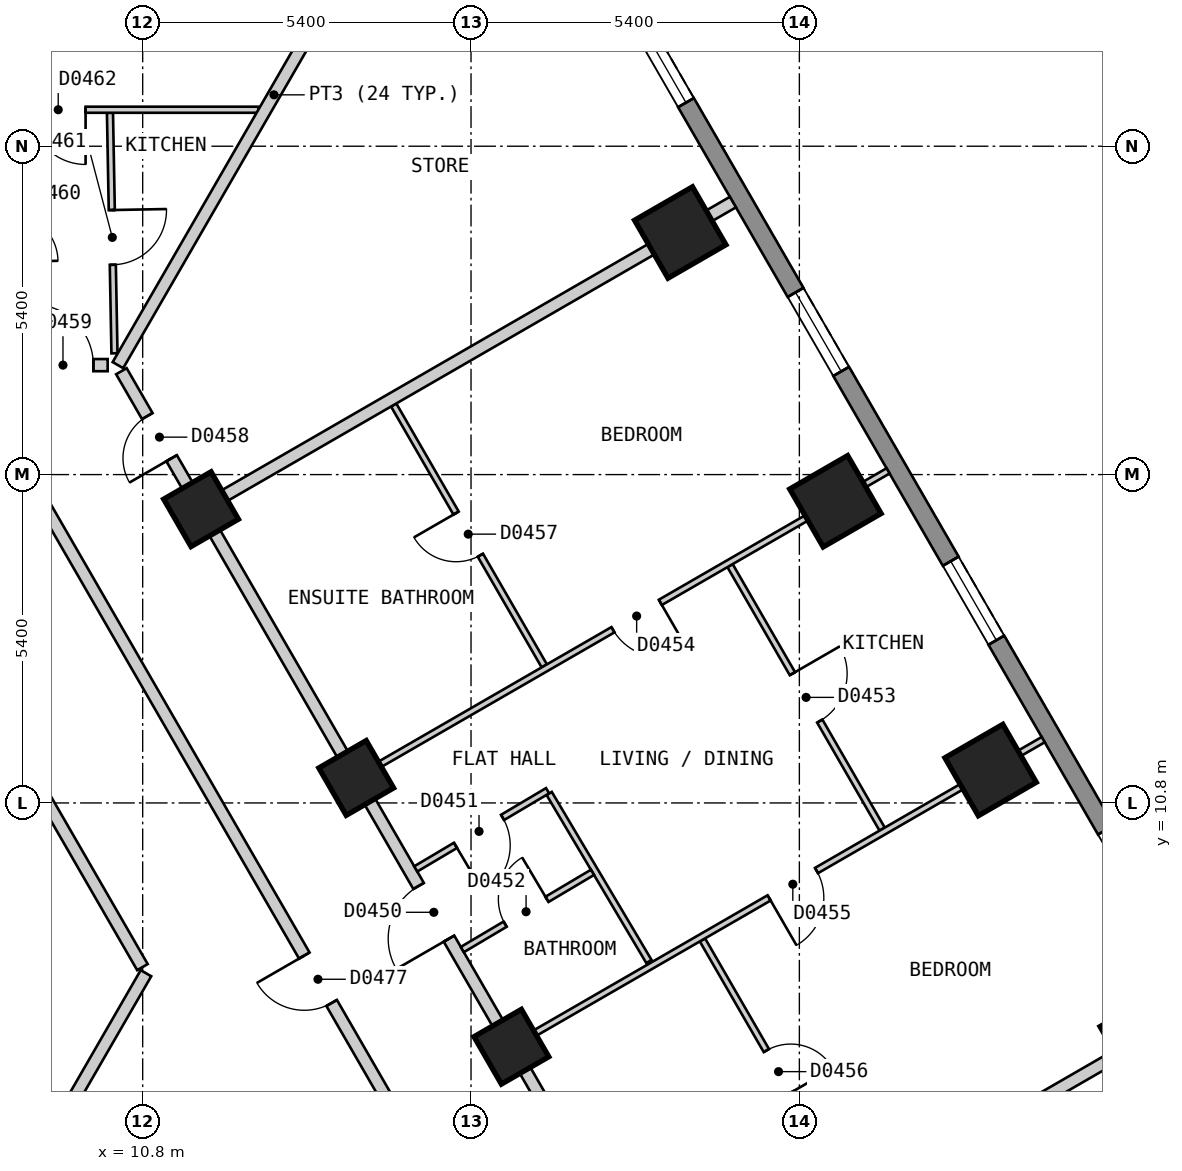
"""IFC4 building model, lengths in metres.
Left out: names, types, materials, properties, quantities, classifications, styles, units other than length and angle.
Written with IfcOpenShell. Run it as: python <this file> out.ifc"""

import sys

from ifc_helpers import new_model, si_unit, direction, frame, frame_2d, origin, origin_2d, place, context, subcontext, project, spatial, polyline, rectangle, outline, extrude, element, fill, save


model = new_model("IFC4")
c1 = context("Model", 3, precision=1e-05, world=origin(), true_north=direction((0.0, 1.0)))
c2 = subcontext(c1, "Body", "Model", "MODEL_VIEW")
j1 = project(units=[si_unit("LENGTHUNIT", "METRE"), si_unit("PLANEANGLEUNIT", "RADIAN")], contexts=[c1])
p1 = place(None, origin())
s1 = spatial("IfcSite", under=j1, at=p1, CompositionType="ELEMENT")
p2 = place(p1, origin())
s2 = spatial("IfcBuilding", under=s1, at=p2, CompositionType="ELEMENT")
p3 = place(p2, frame((0.0, 0.0, 38.4)))
s3 = spatial("IfcBuildingStorey", under=s2, at=p3, CompositionType="ELEMENT", Elevation=38.4)
for number, where, z_axis, x_axis in (
    (1, (27.297, 6.921, 0.0), (0.0, 0.0, 1.0), (-0.5, 0.866, 0.0)),
    (2, (24.745, 11.341, 0.0), (0.0, 0.0, 1.0), (-0.5, 0.866, 0.0)),
    (3, (22.193, 15.761, 0.0), (0.0, 0.0, 1.0), (-0.5, 0.866, 0.0)),
    (4, (19.641, 20.181, 0.0), (0.0, 0.0, 1.0), (-0.5, 0.866, 0.0)),
):
    element("IfcColumn", number, at=place(p3, frame(where, z_axis=z_axis, x_axis=x_axis)), inside=s3, PredefinedType="COLUMN", context=c2, shape_type="SweptSolid", body=[
        extrude(rectangle(XDim=1.1, YDim=1.1, at=origin_2d()), origin(), (0.0, 0.0, 1.0), 3.0),
    ])
for number, where, z_axis, x_axis in (
    (5, (16.864, 6.791, 0.0), (0.0, 0.0, 1.0), (-0.5, 0.866, 0.0)),
    (6, (14.312, 11.211, 0.0), (0.0, 0.0, 1.0), (-0.5, 0.866, 0.0)),
    (7, (11.76, 15.631, 0.0), (0.0, 0.0, 1.0), (-0.5, 0.866, 0.0)),
):
    element("IfcColumn", number, at=place(p3, frame(where, z_axis=z_axis, x_axis=x_axis)), inside=s3, PredefinedType="COLUMN", context=c2, shape_type="SweptSolid", body=[
        extrude(rectangle(XDim=0.9, YDim=0.9, at=origin_2d()), origin(), (0.0, 0.0, 1.0), 3.0),
    ])
p4 = place(p3, frame((31.22, 2.425, 0.0), z_axis=(0.0, 0.0, 1.0), x_axis=(-0.500001938803, 0.866024284413, 0.0)))
e8 = element("IfcWall", 8, at=p4, inside=s3, PredefinedType="SOLIDWALL", context=c2, shape_type="SweptSolid", body=[
    extrude(outline(polyline([(0.0, -0.15), (27.02, -0.15), (26.94, 0.15), (0.08, 0.15), (0.0, -0.15)])), origin(), (0.0, 0.0, 1.0), 2.7),
])
p5 = place(p4, frame((2.553, 0.0, 0.15)))
e9 = element("IfcOpeningElement", 9, at=p5, cuts=e8, PredefinedType="OPENING", context=c2, shape_type="SweptSolid", body=[
    extrude(rectangle(XDim=1.5, YDim=2.1, at=frame_2d((0.75, 1.05))), frame((0.0, 0.16, 0.0), z_axis=(0.0, -1.0, 0.0), x_axis=(1.0, 0.0, 0.0)), (0.0, 0.0, 1.0), 0.32),
])
p6 = place(p4, frame((7.657, 0.0, 0.15)))
e10 = element("IfcOpeningElement", 10, at=p6, cuts=e8, PredefinedType="OPENING", context=c2, shape_type="SweptSolid", body=[
    extrude(rectangle(XDim=1.5, YDim=2.1, at=frame_2d((0.75, 1.05))), frame((0.0, 0.16, 0.0), z_axis=(0.0, -1.0, 0.0), x_axis=(1.0, 0.0, 0.0)), (0.0, 0.0, 1.0), 0.32),
])
p7 = place(p4, frame((12.761, 0.0, 0.15)))
e11 = element("IfcOpeningElement", 11, at=p7, cuts=e8, PredefinedType="OPENING", context=c2, shape_type="SweptSolid", body=[
    extrude(rectangle(XDim=1.5, YDim=2.1, at=frame_2d((0.75, 1.05))), frame((0.0, 0.16, 0.0), z_axis=(0.0, -1.0, 0.0), x_axis=(1.0, 0.0, 0.0)), (0.0, 0.0, 1.0), 0.32),
])
p8 = place(p4, frame((17.865, 0.0, 0.15)))
e12 = element("IfcOpeningElement", 12, at=p8, cuts=e8, PredefinedType="OPENING", context=c2, shape_type="SweptSolid", body=[
    extrude(rectangle(XDim=1.5, YDim=2.1, at=frame_2d((0.75, 1.05))), frame((0.0, 0.16, 0.0), z_axis=(0.0, -1.0, 0.0), x_axis=(1.0, 0.0, 0.0)), (0.0, 0.0, 1.0), 0.32),
])
p9 = place(p4, frame((22.969, 0.0, 0.15)))
e13 = element("IfcOpeningElement", 13, at=p9, cuts=e8, PredefinedType="OPENING", context=c2, shape_type="SweptSolid", body=[
    extrude(rectangle(XDim=1.5, YDim=2.1, at=frame_2d((0.75, 1.05))), frame((0.0, 0.16, 0.0), z_axis=(0.0, -1.0, 0.0), x_axis=(1.0, 0.0, 0.0)), (0.0, 0.0, 1.0), 0.32),
])
p10 = place(p3, frame((6.409, 15.7, 0.0), z_axis=(0.0, 0.0, 1.0), x_axis=(0.499930377127, -0.866065596838, 0.0)))
e14 = element("IfcWall", 14, at=p10, inside=s3, PredefinedType="PARTITIONING", context=c2, shape_type="SweptSolid", body=[
    extrude(rectangle(XDim=8.775, YDim=0.2, at=frame_2d((4.388, 0.0))), origin(), (0.0, 0.0, 1.0), 2.7),
])
p11 = place(p3, frame((9.18, 15.7, 0.0), z_axis=(0.0, 0.0, 1.0), x_axis=(0.500003652032, -0.866023295272, 0.0)))
e15 = element("IfcWall", 15, at=p11, inside=s3, PredefinedType="PARTITIONING", context=c2, shape_type="SweptSolid", body=[
    extrude(rectangle(XDim=18.012, YDim=0.2, at=frame_2d((9.006, 0.0))), origin(), (0.0, 0.0, 1.0), 2.7),
])
p12 = place(p11, frame((8.556, 0.0, 0.0)))
e16 = element("IfcOpeningElement", 16, at=p12, cuts=e15, PredefinedType="OPENING", context=c2, shape_type="SweptSolid", body=[
    extrude(rectangle(XDim=0.9, YDim=2.1, at=frame_2d((0.45, 1.05))), frame((0.0, 0.11, 0.0), z_axis=(0.0, -1.0, 0.0), x_axis=(1.0, 0.0, 0.0)), (0.0, 0.0, 1.0), 0.22),
])
p13 = place(p3, frame((10.45, 17.9, 0.0), z_axis=(0.0, 0.0, 1.0), x_axis=(0.500034352617, -0.866005569383, 0.0)))
e17 = element("IfcWall", 17, at=p13, inside=s3, PredefinedType="PARTITIONING", context=c2, shape_type="SweptSolid", body=[
    extrude(rectangle(XDim=20.553, YDim=0.2, at=frame_2d((10.276, 0.0))), origin(), (0.0, 0.0, 1.0), 2.7),
])
p14 = place(p13, frame((9.775, 0.0, 0.0)))
e18 = element("IfcOpeningElement", 18, at=p14, cuts=e17, PredefinedType="OPENING", context=c2, shape_type="SweptSolid", body=[
    extrude(rectangle(XDim=1.0, YDim=2.1, at=frame_2d((0.5, 1.05))), frame((0.0, 0.11, 0.0), z_axis=(0.0, -1.0, 0.0), x_axis=(1.0, 0.0, 0.0)), (0.0, 0.0, 1.0), 0.22),
])
p15 = place(p13, frame((0.852, 0.0, 0.0)))
e19 = element("IfcOpeningElement", 19, at=p15, cuts=e17, PredefinedType="OPENING", context=c2, shape_type="SweptSolid", body=[
    extrude(rectangle(XDim=0.8, YDim=2.1, at=frame_2d((0.4, 1.05))), frame((0.0, 0.11, 0.0), z_axis=(0.0, -1.0, 0.0), x_axis=(1.0, 0.0, 0.0)), (0.0, 0.0, 1.0), 0.22),
])
p16 = place(p3, frame((-10.276, 18.0, 0.0), z_axis=(0.0, 0.0, 1.0), x_axis=(1.0, 0.0, 0.0)))
e20 = element("IfcWall", 20, at=p16, inside=s3, PredefinedType="PARTITIONING", context=c2, shape_type="SweptSolid", body=[
    extrude(rectangle(XDim=20.5, YDim=0.2, at=frame_2d((10.25, 0.0))), origin(), (0.0, 0.0, 1.0), 2.7),
])
p17 = place(p16, frame((19.265, 0.0, 0.0)))
e21 = element("IfcOpeningElement", 21, at=p17, cuts=e20, PredefinedType="OPENING", context=c2, shape_type="SweptSolid", body=[
    extrude(rectangle(XDim=1.0, YDim=2.1, at=frame_2d((0.5, 1.05))), frame((0.0, 0.11, 0.0), z_axis=(0.0, -1.0, 0.0), x_axis=(1.0, 0.0, 0.0)), (0.0, 0.0, 1.0), 0.22),
])
p18 = place(p16, frame((9.775, 0.0, 0.0)))
e22 = element("IfcOpeningElement", 22, at=p18, cuts=e20, PredefinedType="OPENING", context=c2, shape_type="SweptSolid", body=[
    extrude(rectangle(XDim=1.0, YDim=2.1, at=frame_2d((0.5, 1.05))), frame((0.0, 0.11, 0.0), z_axis=(0.0, -1.0, 0.0), x_axis=(1.0, 0.0, 0.0)), (0.0, 0.0, 1.0), 0.22),
])
p19 = place(p16, frame((4.671, 0.0, 0.0)))
e23 = element("IfcOpeningElement", 23, at=p19, cuts=e20, PredefinedType="OPENING", context=c2, shape_type="SweptSolid", body=[
    extrude(rectangle(XDim=1.0, YDim=2.1, at=frame_2d((0.5, 1.05))), frame((0.0, 0.11, 0.0), z_axis=(0.0, -1.0, 0.0), x_axis=(1.0, 0.0, 0.0)), (0.0, 0.0, 1.0), 0.22),
])
p20 = place(p3, frame((7.028, 1.373, 0.0), z_axis=(0.0, 0.0, 1.0), x_axis=(0.49998574534, 0.86603363356, 0.0)))
e24 = element("IfcWall", 24, at=p20, inside=s3, PredefinedType="PARTITIONING", context=c2, shape_type="SweptSolid", body=[
    extrude(rectangle(XDim=7.652, YDim=0.2, at=frame_2d((3.826, 0.0))), origin(), (0.0, 0.0, 1.0), 2.7),
])
p21 = place(p3, frame((17.485, 10.957, 0.0), z_axis=(0.0, 0.0, 1.0), x_axis=(0.510324709283, -0.859981796956, 0.0)))
e25 = element("IfcWall", 25, at=p21, inside=s3, PredefinedType="PARTITIONING", context=c2, shape_type="SweptSolid", body=[
    extrude(rectangle(XDim=3.215, YDim=0.1, at=frame_2d((1.608, 0.0))), origin(), (0.0, 0.0, 1.0), 2.7),
])
p22 = place(p3, frame((14.928, 17.344, 0.0), z_axis=(0.0, 0.0, 1.0), x_axis=(0.500029609304, -0.86600830817, 0.0)))
e26 = element("IfcWall", 26, at=p22, inside=s3, PredefinedType="PARTITIONING", context=c2, shape_type="SweptSolid", body=[
    extrude(rectangle(XDim=4.954, YDim=0.1, at=frame_2d((2.477, 0.0))), origin(), (0.0, 0.0, 1.0), 2.7),
])
p23 = place(p22, frame((2.052, 0.0, 0.0)))
e27 = element("IfcOpeningElement", 27, at=p23, cuts=e26, PredefinedType="OPENING", context=c2, shape_type="SweptSolid", body=[
    extrude(rectangle(XDim=0.8, YDim=2.1, at=frame_2d((0.4, 1.05))), frame((0.0, 0.06, 0.0), z_axis=(0.0, -1.0, 0.0), x_axis=(1.0, 0.0, 0.0)), (0.0, 0.0, 1.0), 0.12),
])
p24 = place(p3, frame((20.006, 8.548, 0.0), z_axis=(0.0, 0.0, 1.0), x_axis=(0.500055121407, -0.865993577086, 0.0)))
e28 = element("IfcWall", 28, at=p24, inside=s3, PredefinedType="PARTITIONING", context=c2, shape_type="SweptSolid", body=[
    extrude(rectangle(XDim=4.955, YDim=0.1, at=frame_2d((2.478, 0.0))), origin(), (0.0, 0.0, 1.0), 2.7),
])
p25 = place(p24, frame((2.102, 0.0, 0.0)))
e29 = element("IfcOpeningElement", 29, at=p25, cuts=e28, PredefinedType="OPENING", context=c2, shape_type="SweptSolid", body=[
    extrude(rectangle(XDim=0.8, YDim=2.1, at=frame_2d((0.4, 1.05))), frame((0.0, 0.06, 0.0), z_axis=(0.0, -1.0, 0.0), x_axis=(1.0, 0.0, 0.0)), (0.0, 0.0, 1.0), 0.12),
])
p26 = place(p3, frame((20.46, 14.703, 0.0), z_axis=(0.0, 0.0, 1.0), x_axis=(0.499918186652, -0.866072633591, 0.0)))
e30 = element("IfcWall", 30, at=p26, inside=s3, PredefinedType="PARTITIONING", context=c2, shape_type="SweptSolid", body=[
    extrude(rectangle(XDim=5.003, YDim=0.1, at=frame_2d((2.501, 0.0))), origin(), (0.0, 0.0, 1.0), 2.7),
])
p27 = place(p26, frame((2.052, 0.0, 0.0)))
e31 = element("IfcOpeningElement", 31, at=p27, cuts=e30, PredefinedType="OPENING", context=c2, shape_type="SweptSolid", body=[
    extrude(rectangle(XDim=0.9, YDim=2.1, at=frame_2d((0.45, 1.05))), frame((0.0, 0.06, 0.0), z_axis=(0.0, -1.0, 0.0), x_axis=(1.0, 0.0, 0.0)), (0.0, 0.0, 1.0), 0.12),
])
p28 = place(p3, frame((10.262, 22.15, 0.0), z_axis=(0.0, 0.0, 1.0), x_axis=(0.018696971826, -0.999825196344, 0.0)))
e32 = element("IfcWall", 32, at=p28, inside=s3, PredefinedType="PARTITIONING", context=c2, shape_type="SweptSolid", body=[
    extrude(rectangle(XDim=3.957, YDim=0.1, at=frame_2d((1.978, 0.0))), origin(), (0.0, 0.0, 1.0), 2.7),
])
p29 = place(p28, frame((1.6, 0.0, 0.0)))
e33 = element("IfcOpeningElement", 33, at=p29, cuts=e32, PredefinedType="OPENING", context=c2, shape_type="SweptSolid", body=[
    extrude(rectangle(XDim=0.9, YDim=2.1, at=frame_2d((0.45, 1.05))), frame((0.0, 0.06, 0.0), z_axis=(0.0, -1.0, 0.0), x_axis=(1.0, 0.0, 0.0)), (0.0, 0.0, 1.0), 0.12),
])
p30 = place(p3, frame((7.755, 22.2, 0.0), z_axis=(0.0, 0.0, 1.0), x_axis=(1.0, 0.0, 0.0)))
e34 = element("IfcWall", 34, at=p30, inside=s3, PredefinedType="PARTITIONING", context=c2, shape_type="SweptSolid", body=[
    extrude(rectangle(XDim=4.947, YDim=0.1, at=frame_2d((2.474, 0.0))), origin(), (0.0, 0.0, 1.0), 2.7),
])
p31 = place(p30, frame((1.206, 0.0, 0.0)))
e35 = element("IfcOpeningElement", 35, at=p31, cuts=e34, PredefinedType="OPENING", context=c2, shape_type="SweptSolid", body=[
    extrude(rectangle(XDim=0.9, YDim=2.1, at=frame_2d((0.45, 1.05))), frame((0.0, 0.06, 0.0), z_axis=(0.0, -1.0, 0.0), x_axis=(1.0, 0.0, 0.0)), (0.0, 0.0, 1.0), 0.12),
])
p32 = place(p3, frame((16.95, 6.841, 0.0), z_axis=(0.0, 0.0, 1.0), x_axis=(0.866022959057, 0.500004234368, 0.0)))
e36 = element("IfcWall", 36, at=p32, inside=s3, PredefinedType="PARTITIONING", context=c2, shape_type="SweptSolid", body=[
    extrude(rectangle(XDim=10.0, YDim=0.1, at=frame_2d((5.0, 0.0))), origin(), (0.0, 0.0, 1.0), 2.7),
])
p33 = place(p32, frame((4.795, 0.0, 0.0)))
e37 = element("IfcOpeningElement", 37, at=p33, cuts=e36, PredefinedType="OPENING", context=c2, shape_type="SweptSolid", body=[
    extrude(rectangle(XDim=0.9, YDim=2.1, at=frame_2d((0.45, 1.05))), frame((0.0, 0.06, 0.0), z_axis=(0.0, -1.0, 0.0), x_axis=(1.0, 0.0, 0.0)), (0.0, 0.0, 1.0), 0.12),
])
p34 = place(p3, frame((14.399, 11.261, 0.0), z_axis=(0.0, 0.0, 1.0), x_axis=(0.866022959057, 0.500004234368, 0.0)))
e38 = element("IfcWall", 38, at=p34, inside=s3, PredefinedType="PARTITIONING", context=c2, shape_type="SweptSolid", body=[
    extrude(rectangle(XDim=10.0, YDim=0.1, at=frame_2d((5.0, 0.0))), origin(), (0.0, 0.0, 1.0), 2.7),
])
p35 = place(p34, frame((4.775, 0.0, 0.0)))
e39 = element("IfcOpeningElement", 39, at=p35, cuts=e38, PredefinedType="OPENING", context=c2, shape_type="SweptSolid", body=[
    extrude(rectangle(XDim=0.9, YDim=2.1, at=frame_2d((0.45, 1.05))), frame((0.0, 0.06, 0.0), z_axis=(0.0, -1.0, 0.0), x_axis=(1.0, 0.0, 0.0)), (0.0, 0.0, 1.0), 0.12),
])
p36 = place(p3, frame((16.057, 8.389, 0.0), z_axis=(0.0, 0.0, 1.0), x_axis=(0.860077993161, 0.510162567893, 0.0)))
e40 = element("IfcWall", 40, at=p36, inside=s3, PredefinedType="PARTITIONING", context=c2, shape_type="SweptSolid", body=[
    extrude(rectangle(XDim=2.49, YDim=0.1, at=frame_2d((1.245, 0.0))), origin(), (0.0, 0.0, 1.0), 2.7),
])
p37 = place(p36, frame((0.819, 0.0, 0.0)))
e41 = element("IfcOpeningElement", 41, at=p37, cuts=e40, PredefinedType="OPENING", context=c2, shape_type="SweptSolid", body=[
    extrude(rectangle(XDim=0.8, YDim=2.1, at=frame_2d((0.4, 1.05))), frame((0.0, 0.06, 0.0), z_axis=(0.0, -1.0, 0.0), x_axis=(1.0, 0.0, 0.0)), (0.0, 0.0, 1.0), 0.12),
])
p38 = place(p3, frame((15.291, 9.715, 0.0), z_axis=(0.0, 0.0, 1.0), x_axis=(0.860088508644, 0.51014483953, 0.0)))
e42 = element("IfcWall", 42, at=p38, inside=s3, PredefinedType="PARTITIONING", context=c2, shape_type="SweptSolid", body=[
    extrude(rectangle(XDim=2.521, YDim=0.1, at=frame_2d((1.26, 0.0))), origin(), (0.0, 0.0, 1.0), 2.7),
])
p39 = place(p38, frame((0.76, 0.0, 0.0)))
e43 = element("IfcOpeningElement", 43, at=p39, cuts=e42, PredefinedType="OPENING", context=c2, shape_type="SweptSolid", body=[
    extrude(rectangle(XDim=0.9, YDim=2.1, at=frame_2d((0.45, 1.05))), frame((0.0, 0.06, 0.0), z_axis=(0.0, -1.0, 0.0), x_axis=(1.0, 0.0, 0.0)), (0.0, 0.0, 1.0), 0.12),
])
p40 = place(p3, frame((10.393, 18.0, 0.0), z_axis=(0.0, 0.0, 1.0), x_axis=(0.499945497007, 0.866056868816, 0.0)))
e44 = element("IfcWall", 44, at=p40, inside=s3, PredefinedType="PARTITIONING", context=c2, shape_type="SweptSolid", body=[
    extrude(rectangle(XDim=10.265, YDim=0.2, at=frame_2d((5.132, 0.0))), origin(), (0.0, 0.0, 1.0), 2.7),
])
p41 = place(p3, frame((19.503, 2.421, 0.0), z_axis=(0.0, 0.0, 1.0), x_axis=(0.866065245018, 0.499930986609, 0.0)))
e45 = element("IfcWall", 45, at=p41, inside=s3, PredefinedType="PARTITIONING", context=c2, shape_type="SweptSolid", body=[
    extrude(rectangle(XDim=10.0, YDim=0.2, at=frame_2d((5.0, 0.0))), origin(), (0.0, 0.0, 1.0), 2.7),
])
p42 = place(p3, frame((11.847, 15.681, 0.0), z_axis=(0.0, 0.0, 1.0), x_axis=(0.866022959057, 0.500004234368, 0.0)))
e46 = element("IfcWall", 46, at=p42, inside=s3, PredefinedType="PARTITIONING", context=c2, shape_type="SweptSolid", body=[
    extrude(rectangle(XDim=10.0, YDim=0.2, at=frame_2d((5.0, 0.0))), origin(), (0.0, 0.0, 1.0), 2.7),
])
p43 = place(p7, origin())
e47 = element("IfcWindow", 47, at=p43, inside=s3, PartitioningType="SINGLE_PANEL", PredefinedType="WINDOW", context=c2, shape_type="SweptSolid", body=[
    extrude(rectangle(XDim=1.5, YDim=2.1, at=frame_2d((0.75, 1.05))), frame((0.0, 0.03, 0.0), z_axis=(0.0, -1.0, 0.0), x_axis=(1.0, 0.0, 0.0)), (0.0, 0.0, 1.0), 0.06),
])
fill(e11, e47)
p44 = place(p8, origin())
e48 = element("IfcWindow", 48, at=p44, inside=s3, PartitioningType="SINGLE_PANEL", PredefinedType="WINDOW", context=c2, shape_type="SweptSolid", body=[
    extrude(rectangle(XDim=1.5, YDim=2.1, at=frame_2d((0.75, 1.05))), frame((0.0, 0.03, 0.0), z_axis=(0.0, -1.0, 0.0), x_axis=(1.0, 0.0, 0.0)), (0.0, 0.0, 1.0), 0.06),
])
fill(e12, e48)
p45 = place(p9, origin())
e49 = element("IfcWindow", 49, at=p45, inside=s3, PartitioningType="SINGLE_PANEL", PredefinedType="WINDOW", context=c2, shape_type="SweptSolid", body=[
    extrude(rectangle(XDim=1.5, YDim=2.1, at=frame_2d((0.75, 1.05))), frame((0.0, 0.03, 0.0), z_axis=(0.0, -1.0, 0.0), x_axis=(1.0, 0.0, 0.0)), (0.0, 0.0, 1.0), 0.06),
])
fill(e13, e49)
p46 = place(p14, origin())
e50 = element("IfcDoor", 50, at=p46, inside=s3, OperationType="SINGLE_SWING_RIGHT", PredefinedType="DOOR", context=c2, shape_type="SweptSolid", body=[
    extrude(rectangle(XDim=1.0, YDim=2.1, at=frame_2d((0.5, 1.05))), frame((0.0, 0.025, 0.0), z_axis=(0.0, -1.0, 0.0), x_axis=(1.0, 0.0, 0.0)), (0.0, 0.0, 1.0), 0.05),
])
fill(e18, e50)
p47 = place(p39, origin())
e51 = element("IfcDoor", 51, at=p47, inside=s3, OperationType="SINGLE_SWING_LEFT", PredefinedType="DOOR", context=c2, shape_type="SweptSolid", body=[
    extrude(rectangle(XDim=0.9, YDim=2.1, at=frame_2d((0.45, 1.05))), frame((0.0, 0.025, 0.0), z_axis=(0.0, -1.0, 0.0), x_axis=(1.0, 0.0, 0.0)), (0.0, 0.0, 1.0), 0.05),
])
fill(e43, e51)
p48 = place(p37, origin())
e52 = element("IfcDoor", 52, at=p48, inside=s3, OperationType="SINGLE_SWING_RIGHT", PredefinedType="DOOR", context=c2, shape_type="SweptSolid", body=[
    extrude(rectangle(XDim=0.8, YDim=2.1, at=frame_2d((0.4, 1.05))), frame((0.0, 0.025, 0.0), z_axis=(0.0, -1.0, 0.0), x_axis=(1.0, 0.0, 0.0)), (0.0, 0.0, 1.0), 0.05),
])
fill(e41, e52)
p49 = place(p27, origin())
e53 = element("IfcDoor", 53, at=p49, inside=s3, OperationType="SINGLE_SWING_LEFT", PredefinedType="DOOR", context=c2, shape_type="SweptSolid", body=[
    extrude(rectangle(XDim=0.9, YDim=2.1, at=frame_2d((0.45, 1.05))), frame((0.0, 0.025, 0.0), z_axis=(0.0, -1.0, 0.0), x_axis=(1.0, 0.0, 0.0)), (0.0, 0.0, 1.0), 0.05),
])
fill(e31, e53)
p50 = place(p35, origin())
e54 = element("IfcDoor", 54, at=p50, inside=s3, OperationType="SINGLE_SWING_RIGHT", PredefinedType="DOOR", context=c2, shape_type="SweptSolid", body=[
    extrude(rectangle(XDim=0.9, YDim=2.1, at=frame_2d((0.45, 1.05))), frame((0.0, 0.025, 0.0), z_axis=(0.0, -1.0, 0.0), x_axis=(1.0, 0.0, 0.0)), (0.0, 0.0, 1.0), 0.05),
])
fill(e39, e54)
p51 = place(p33, origin())
e55 = element("IfcDoor", 55, at=p51, inside=s3, OperationType="SINGLE_SWING_LEFT", PredefinedType="DOOR", context=c2, shape_type="SweptSolid", body=[
    extrude(rectangle(XDim=0.9, YDim=2.1, at=frame_2d((0.45, 1.05))), frame((0.0, 0.025, 0.0), z_axis=(0.0, -1.0, 0.0), x_axis=(1.0, 0.0, 0.0)), (0.0, 0.0, 1.0), 0.05),
])
fill(e37, e55)
p52 = place(p25, origin())
e56 = element("IfcDoor", 56, at=p52, inside=s3, OperationType="SINGLE_SWING_RIGHT", PredefinedType="DOOR", context=c2, shape_type="SweptSolid", body=[
    extrude(rectangle(XDim=0.8, YDim=2.1, at=frame_2d((0.4, 1.05))), frame((0.0, 0.025, 0.0), z_axis=(0.0, -1.0, 0.0), x_axis=(1.0, 0.0, 0.0)), (0.0, 0.0, 1.0), 0.05),
])
fill(e29, e56)
p53 = place(p23, origin())
e57 = element("IfcDoor", 57, at=p53, inside=s3, OperationType="SINGLE_SWING_LEFT", PredefinedType="DOOR", context=c2, shape_type="SweptSolid", body=[
    extrude(rectangle(XDim=0.8, YDim=2.1, at=frame_2d((0.4, 1.05))), frame((0.0, 0.025, 0.0), z_axis=(0.0, -1.0, 0.0), x_axis=(1.0, 0.0, 0.0)), (0.0, 0.0, 1.0), 0.05),
])
fill(e27, e57)
p54 = place(p15, origin())
e58 = element("IfcDoor", 58, at=p54, inside=s3, OperationType="SINGLE_SWING_RIGHT", PredefinedType="DOOR", context=c2, shape_type="SweptSolid", body=[
    extrude(rectangle(XDim=0.8, YDim=2.1, at=frame_2d((0.4, 1.05))), frame((0.0, 0.025, 0.0), z_axis=(0.0, -1.0, 0.0), x_axis=(1.0, 0.0, 0.0)), (0.0, 0.0, 1.0), 0.05),
])
fill(e19, e58)
p55 = place(p17, origin())
e59 = element("IfcDoor", 59, at=p55, inside=s3, OperationType="SINGLE_SWING_LEFT", PredefinedType="DOOR", context=c2, shape_type="SweptSolid", body=[
    extrude(rectangle(XDim=1.0, YDim=2.1, at=frame_2d((0.5, 1.05))), frame((0.0, 0.025, 0.0), z_axis=(0.0, -1.0, 0.0), x_axis=(1.0, 0.0, 0.0)), (0.0, 0.0, 1.0), 0.05),
])
fill(e21, e59)
p56 = place(p29, origin())
e60 = element("IfcDoor", 60, at=p56, inside=s3, OperationType="SINGLE_SWING_LEFT", PredefinedType="DOOR", context=c2, shape_type="SweptSolid", body=[
    extrude(rectangle(XDim=0.9, YDim=2.1, at=frame_2d((0.45, 1.05))), frame((0.0, 0.025, 0.0), z_axis=(0.0, -1.0, 0.0), x_axis=(1.0, 0.0, 0.0)), (0.0, 0.0, 1.0), 0.05),
])
fill(e33, e60)
p57 = place(p31, origin())
e61 = element("IfcDoor", 61, at=p57, inside=s3, OperationType="SINGLE_SWING_RIGHT", PredefinedType="DOOR", context=c2, shape_type="SweptSolid", body=[
    extrude(rectangle(XDim=0.9, YDim=2.1, at=frame_2d((0.45, 1.05))), frame((0.0, 0.025, 0.0), z_axis=(0.0, -1.0, 0.0), x_axis=(1.0, 0.0, 0.0)), (0.0, 0.0, 1.0), 0.05),
])
fill(e35, e61)
p58 = place(p12, origin())
e62 = element("IfcDoor", 62, at=p58, inside=s3, OperationType="SINGLE_SWING_LEFT", PredefinedType="DOOR", context=c2, shape_type="SweptSolid", body=[
    extrude(rectangle(XDim=0.9, YDim=2.1, at=frame_2d((0.45, 1.05))), frame((0.0, 0.025, 0.0), z_axis=(0.0, -1.0, 0.0), x_axis=(1.0, 0.0, 0.0)), (0.0, 0.0, 1.0), 0.05),
])
fill(e16, e62)
save(model, sys.argv[1])
